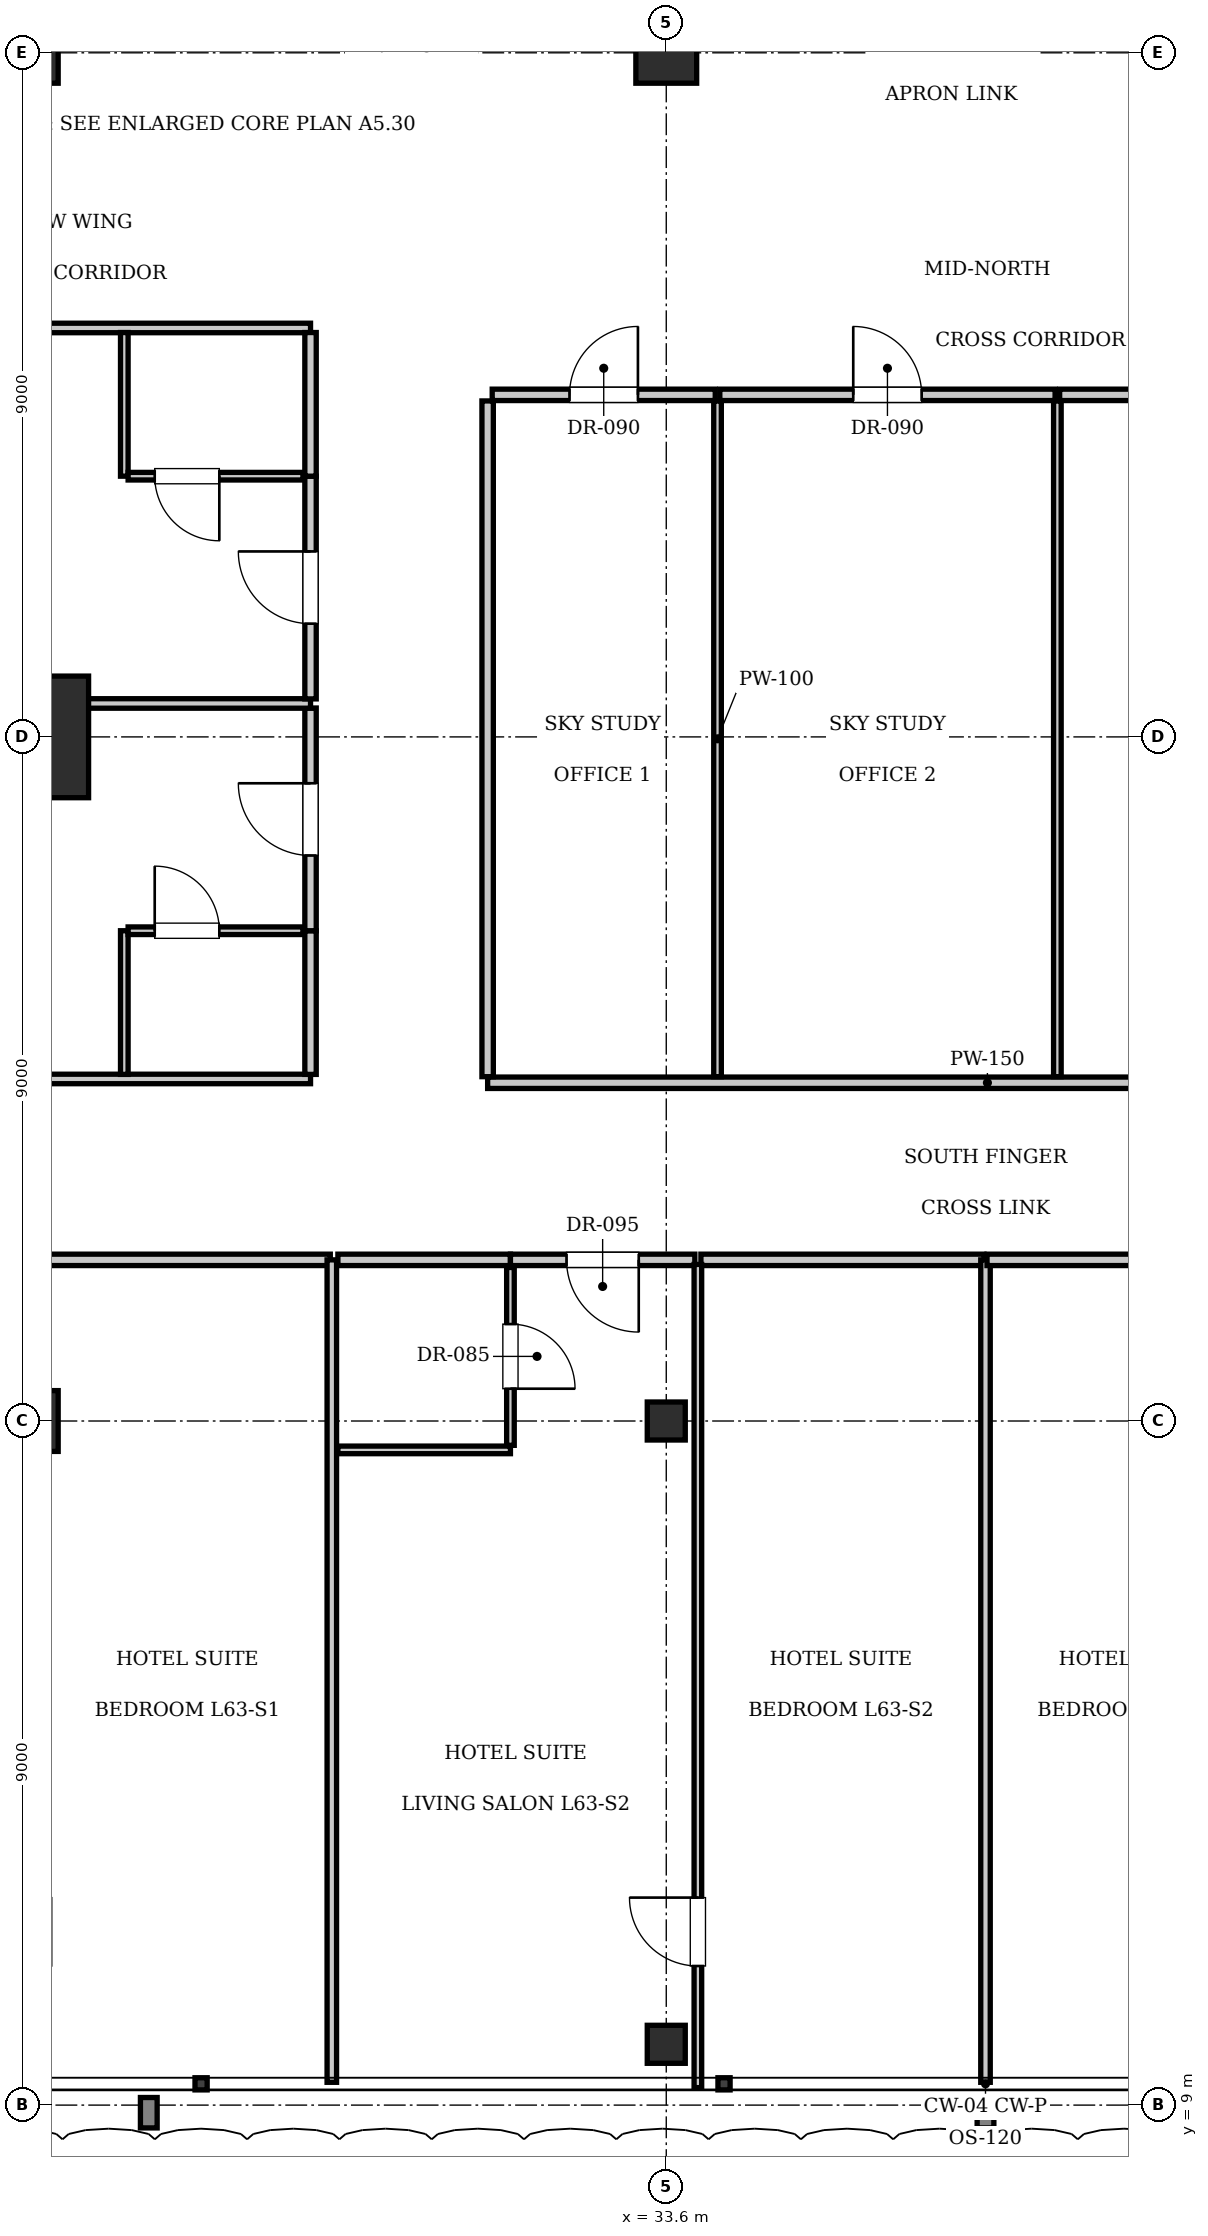
"""IFC4 building model, lengths in metres.
Left out: names, types, materials, properties, quantities, classifications, styles, units other than length and angle.
Written with IfcOpenShell. Run it as: python <this file> out.ifc"""

import sys

from ifc_helpers import new_model, si_unit, direction, frame, frame_2d, origin, origin_2d, place, context, subcontext, project, spatial, rectangle, i_section, extrude, element, fill, save


model = new_model("IFC4")
c1 = context("Model", 3, precision=1e-05, world=origin(), true_north=direction((0.0, 1.0)))
c2 = subcontext(c1, "Body", "Model", "MODEL_VIEW")
j1 = project(units=[si_unit("LENGTHUNIT", "METRE"), si_unit("PLANEANGLEUNIT", "RADIAN")], contexts=[c1])
p1 = place(None, origin())
s1 = spatial("IfcSite", under=j1, at=p1, CompositionType="ELEMENT")
p2 = place(p1, origin())
s2 = spatial("IfcBuilding", under=s1, at=p2, CompositionType="ELEMENT")
p3 = place(p2, frame((0.0, 0.0, 258.65)))
s3 = spatial("IfcBuildingStorey", under=s2, at=p3, CompositionType="ELEMENT", Elevation=258.65)
p4 = place(p3, frame((25.2, 27.0, 0.0), z_axis=(0.0, 0.0, 1.0), x_axis=(1.0, 0.0, 0.0)))
e1 = element("IfcColumn", 1, at=p4, inside=s3, PredefinedType="COLUMN", context=c2, shape_type="SweptSolid", body=[
    extrude(rectangle(XDim=1.6, YDim=1.6, at=origin_2d()), origin(), (0.0, 0.0, 1.0), 3.85),
])
for number, where, z_axis, x_axis in (
    (2, (25.2, 36.0, 0.0), (0.0, 0.0, 1.0), (1.0, 0.0, 0.0)),
    (3, (33.6, 36.0, 0.0), (0.0, 0.0, 1.0), (1.0, 0.0, 0.0)),
    (4, (25.2, 18.0, 0.0), (0.0, 0.0, 1.0), (1.0, 0.0, 0.0)),
):
    element("IfcColumn", number, at=place(p3, frame(where, z_axis=z_axis, x_axis=x_axis)), inside=s3, PredefinedType="COLUMN", context=c2, shape_type="SweptSolid", body=[
        extrude(rectangle(XDim=0.8, YDim=0.8, at=origin_2d()), origin(), (0.0, 0.0, 1.0), 3.85),
    ])
for number, where, z_axis, x_axis in (
    (5, (33.6, 18.0, 0.0), (0.0, 0.0, 1.0), (1.0, 0.0, 0.0)),
    (6, (33.6, 9.8, 0.0), (0.0, 0.0, 1.0), (1.0, 0.0, 0.0)),
):
    element("IfcColumn", number, at=place(p3, frame(where, z_axis=z_axis, x_axis=x_axis)), inside=s3, PredefinedType="COLUMN", context=c2, shape_type="SweptSolid", body=[
        extrude(i_section(OverallWidth=0.5, OverallDepth=0.5, WebThickness=0.022, FlangeThickness=0.032, at=origin_2d()), origin(), (0.0, 0.0, 1.0), 3.85),
    ])
p5 = place(p3, frame((31.25, 22.45, 0.0), z_axis=(0.0, 0.0, 1.0), x_axis=(1.0, 0.0, 0.0)))
e7 = element("IfcWall", 7, at=p5, inside=s3, PredefinedType="PARTITIONING", context=c2, shape_type="SweptSolid", body=[
    extrude(rectangle(XDim=13.15, YDim=0.15, at=frame_2d((6.575, 0.0))), origin(), (0.0, 0.0, 1.0), 3.61),
])
p6 = place(p3, frame((31.25, 22.53, 0.0), z_axis=(0.0, 0.0, 1.0), x_axis=(0.0, 1.0, 0.0)))
e8 = element("IfcWall", 8, at=p6, inside=s3, PredefinedType="PARTITIONING", context=c2, shape_type="SweptSolid", body=[
    extrude(rectangle(XDim=8.89, YDim=0.15, at=frame_2d((4.445, 0.0))), origin(), (0.0, 0.0, 1.0), 3.61),
])
p7 = place(p3, frame((31.31, 31.5, 0.0), z_axis=(0.0, 0.0, 1.0), x_axis=(1.0, 0.0, 0.0)))
e9 = element("IfcWall", 9, at=p7, inside=s3, PredefinedType="PARTITIONING", context=c2, shape_type="SweptSolid", body=[
    extrude(rectangle(XDim=2.934, YDim=0.15, at=frame_2d((1.467, 0.0))), origin(), (0.0, 0.0, 1.0), 3.61),
])
p8 = place(p7, frame((1.017, 0.0, 0.0)))
e10 = element("IfcOpeningElement", 10, at=p8, cuts=e9, PredefinedType="OPENING", context=c2, shape_type="SweptSolid", body=[
    extrude(rectangle(XDim=0.9, YDim=2.1, at=frame_2d((0.45, 1.05))), frame((0.0, 0.085, 0.0), z_axis=(0.0, -1.0, 0.0), x_axis=(1.0, 0.0, 0.0)), (0.0, 0.0, 1.0), 0.17),
])
p9 = place(p3, frame((34.274, 22.53, 0.0), z_axis=(0.0, 0.0, 1.0), x_axis=(0.0, 1.0, 0.0)))
e11 = element("IfcWall", 11, at=p9, inside=s3, PredefinedType="PARTITIONING", context=c2, shape_type="SweptSolid", body=[
    extrude(rectangle(XDim=8.89, YDim=0.1, at=frame_2d((4.445, 0.0))), origin(), (0.0, 0.0, 1.0), 3.61),
])
p10 = place(p3, frame((34.304, 31.5, 0.0), z_axis=(0.0, 0.0, 1.0), x_axis=(1.0, 0.0, 0.0)))
e12 = element("IfcWall", 12, at=p10, inside=s3, PredefinedType="PARTITIONING", context=c2, shape_type="SweptSolid", body=[
    extrude(rectangle(XDim=4.411, YDim=0.15, at=frame_2d((2.206, 0.0))), origin(), (0.0, 0.0, 1.0), 3.61),
])
p11 = place(p10, frame((1.756, 0.0, 0.0)))
e13 = element("IfcOpeningElement", 13, at=p11, cuts=e12, PredefinedType="OPENING", context=c2, shape_type="SweptSolid", body=[
    extrude(rectangle(XDim=0.9, YDim=2.1, at=frame_2d((0.45, 1.05))), frame((0.0, 0.085, 0.0), z_axis=(0.0, -1.0, 0.0), x_axis=(1.0, 0.0, 0.0)), (0.0, 0.0, 1.0), 0.17),
])
p12 = place(p3, frame((38.746, 22.53, 0.0), z_axis=(0.0, 0.0, 1.0), x_axis=(0.0, 1.0, 0.0)))
e14 = element("IfcWall", 14, at=p12, inside=s3, PredefinedType="PARTITIONING", context=c2, shape_type="SweptSolid", body=[
    extrude(rectangle(XDim=8.89, YDim=0.1, at=frame_2d((4.445, 0.0))), origin(), (0.0, 0.0, 1.0), 3.61),
])
p13 = place(p3, frame((38.775, 31.5, 0.0), z_axis=(0.0, 0.0, 1.0), x_axis=(1.0, 0.0, 0.0)))
e15 = element("IfcWall", 15, at=p13, inside=s3, PredefinedType="PARTITIONING", context=c2, shape_type="SweptSolid", body=[
    extrude(rectangle(XDim=5.565, YDim=0.15, at=frame_2d((2.782, 0.0))), origin(), (0.0, 0.0, 1.0), 3.61),
])
p14 = place(p13, frame((2.332, 0.0, 0.0)))
e16 = element("IfcOpeningElement", 16, at=p14, cuts=e15, PredefinedType="OPENING", context=c2, shape_type="SweptSolid", body=[
    extrude(rectangle(XDim=0.9, YDim=2.1, at=frame_2d((0.45, 1.05))), frame((0.0, 0.085, 0.0), z_axis=(0.0, -1.0, 0.0), x_axis=(1.0, 0.0, 0.0)), (0.0, 0.0, 1.0), 0.17),
])
p15 = place(p3, frame((25.456, 20.12, 0.0), z_axis=(0.0, 0.0, 1.0), x_axis=(1.0, 0.0, 0.0)))
e17 = element("IfcWall", 17, at=p15, inside=s3, PredefinedType="PARTITIONING", context=c2, shape_type="SweptSolid", body=[
    extrude(rectangle(XDim=3.724, YDim=0.15, at=frame_2d((1.862, 0.0))), origin(), (0.0, 0.0, 1.0), 3.61),
])
p16 = place(p3, frame((29.2, 9.3, 0.0), z_axis=(0.0, 0.0, 1.0), x_axis=(0.0, 1.0, 0.0)))
e18 = element("IfcWall", 18, at=p16, inside=s3, PredefinedType="PARTITIONING", context=c2, shape_type="SweptSolid", body=[
    extrude(rectangle(XDim=10.82, YDim=0.125, at=frame_2d((5.41, 0.0))), origin(), (0.0, 0.0, 1.0), 3.61),
])
p17 = place(p3, frame((29.28, 20.12, 0.0), z_axis=(0.0, 0.0, 1.0), x_axis=(1.0, 0.0, 0.0)))
e19 = element("IfcWall", 19, at=p17, inside=s3, PredefinedType="PARTITIONING", context=c2, shape_type="SweptSolid", body=[
    extrude(rectangle(XDim=2.27, YDim=0.15, at=frame_2d((1.135, 0.0))), origin(), (0.0, 0.0, 1.0), 3.61),
])
p18 = place(p3, frame((29.28, 17.62, 0.0), z_axis=(0.0, 0.0, 1.0), x_axis=(1.0, 0.0, 0.0)))
e20 = element("IfcWall", 20, at=p18, inside=s3, PredefinedType="PARTITIONING", context=c2, shape_type="SweptSolid", body=[
    extrude(rectangle(XDim=2.27, YDim=0.1, at=frame_2d((1.135, 0.0))), origin(), (0.0, 0.0, 1.0), 3.61),
])
p19 = place(p3, frame((31.55, 17.68, 0.0), z_axis=(0.0, 0.0, 1.0), x_axis=(0.0, 1.0, 0.0)))
e21 = element("IfcWall", 21, at=p19, inside=s3, PredefinedType="PARTITIONING", context=c2, shape_type="SweptSolid", body=[
    extrude(rectangle(XDim=2.34, YDim=0.1, at=frame_2d((1.17, 0.0))), origin(), (0.0, 0.0, 1.0), 3.61),
])
p20 = place(p19, frame((0.745, 0.0, 0.0)))
e22 = element("IfcOpeningElement", 22, at=p20, cuts=e21, PredefinedType="OPENING", context=c2, shape_type="SweptSolid", body=[
    extrude(rectangle(XDim=0.85, YDim=2.1, at=frame_2d((0.425, 1.05))), frame((0.0, 0.06, 0.0), z_axis=(0.0, -1.0, 0.0), x_axis=(1.0, 0.0, 0.0)), (0.0, 0.0, 1.0), 0.12),
])
p21 = place(p3, frame((31.55, 20.12, 0.0), z_axis=(0.0, 0.0, 1.0), x_axis=(1.0, 0.0, 0.0)))
e23 = element("IfcWall", 23, at=p21, inside=s3, PredefinedType="PARTITIONING", context=c2, shape_type="SweptSolid", body=[
    extrude(rectangle(XDim=2.426, YDim=0.15, at=frame_2d((1.213, 0.0))), origin(), (0.0, 0.0, 1.0), 3.61),
])
p22 = place(p21, frame((0.738, 0.0, 0.0)))
e24 = element("IfcOpeningElement", 24, at=p22, cuts=e23, PredefinedType="OPENING", context=c2, shape_type="SweptSolid", body=[
    extrude(rectangle(XDim=0.95, YDim=2.15, at=frame_2d((0.475, 1.075))), frame((0.0, 0.085, 0.0), z_axis=(0.0, -1.0, 0.0), x_axis=(1.0, 0.0, 0.0)), (0.0, 0.0, 1.0), 0.17),
])
p23 = place(p3, frame((34.056, 20.12, 0.0), z_axis=(0.0, 0.0, 1.0), x_axis=(1.0, 0.0, 0.0)))
e25 = element("IfcWall", 25, at=p23, inside=s3, PredefinedType="PARTITIONING", context=c2, shape_type="SweptSolid", body=[
    extrude(rectangle(XDim=3.724, YDim=0.15, at=frame_2d((1.862, 0.0))), origin(), (0.0, 0.0, 1.0), 3.61),
])
p24 = place(p3, frame((34.016, 9.23, 0.0), z_axis=(0.0, 0.0, 1.0), x_axis=(0.0, 1.0, 0.0)))
e26 = element("IfcWall", 26, at=p24, inside=s3, PredefinedType="PARTITIONING", context=c2, shape_type="SweptSolid", body=[
    extrude(rectangle(XDim=10.83, YDim=0.1, at=frame_2d((5.415, 0.0))), origin(), (0.0, 0.0, 1.0), 3.61),
])
p25 = place(p24, frame((1.6, 0.0, 0.0)))
e27 = element("IfcOpeningElement", 27, at=p25, cuts=e26, PredefinedType="OPENING", context=c2, shape_type="SweptSolid", body=[
    extrude(rectangle(XDim=0.9, YDim=2.1, at=frame_2d((0.45, 1.05))), frame((0.0, 0.06, 0.0), z_axis=(0.0, -1.0, 0.0), x_axis=(1.0, 0.0, 0.0)), (0.0, 0.0, 1.0), 0.12),
])
p26 = place(p3, frame((37.8, 9.3, 0.0), z_axis=(0.0, 0.0, 1.0), x_axis=(0.0, 1.0, 0.0)))
e28 = element("IfcWall", 28, at=p26, inside=s3, PredefinedType="PARTITIONING", context=c2, shape_type="SweptSolid", body=[
    extrude(rectangle(XDim=10.82, YDim=0.125, at=frame_2d((5.41, 0.0))), origin(), (0.0, 0.0, 1.0), 3.457),
])
p27 = place(p3, frame((37.82, 20.12, 0.0), z_axis=(0.0, 0.0, 1.0), x_axis=(1.0, 0.0, 0.0)))
e29 = element("IfcWall", 29, at=p27, inside=s3, PredefinedType="PARTITIONING", context=c2, shape_type="SweptSolid", body=[
    extrude(rectangle(XDim=3.724, YDim=0.15, at=frame_2d((1.862, 0.0))), origin(), (0.0, 0.0, 1.0), 3.61),
])
for number, where, z_axis, x_axis in (
    (30, (15.5, 22.5, 0.0), (0.0, 0.0, 1.0), (1.0, 0.0, 0.0)),
    (31, (15.5, 32.38, 0.0), (0.0, 0.0, 1.0), (1.0, 0.0, 0.0)),
):
    element("IfcWall", number, at=place(p3, frame(where, z_axis=z_axis, x_axis=x_axis)), inside=s3, PredefinedType="PARTITIONING", context=c2, shape_type="SweptSolid", body=[
        extrude(rectangle(XDim=13.42, YDim=0.125, at=frame_2d((6.71, 0.0))), origin(), (0.0, 0.0, 1.0), 3.61),
    ])
p28 = place(p3, frame((28.92, 22.56, 0.0), z_axis=(0.0, 0.0, 1.0), x_axis=(0.0, 1.0, 0.0)))
e32 = element("IfcWall", 32, at=p28, inside=s3, PredefinedType="PARTITIONING", context=c2, shape_type="SweptSolid", body=[
    extrude(rectangle(XDim=1.89, YDim=0.15, at=frame_2d((0.945, 0.0))), origin(), (0.0, 0.0, 1.0), 3.61),
])
p29 = place(p3, frame((28.92, 24.45, 0.0), z_axis=(0.0, 0.0, 1.0), x_axis=(0.0, 1.0, 0.0)))
e33 = element("IfcWall", 33, at=p29, inside=s3, PredefinedType="PARTITIONING", context=c2, shape_type="SweptSolid", body=[
    extrude(rectangle(XDim=2.93, YDim=0.15, at=frame_2d((1.465, 0.0))), origin(), (0.0, 0.0, 1.0), 3.61),
])
p30 = place(p29, frame((0.99, 0.0, 0.0)))
e34 = element("IfcOpeningElement", 34, at=p30, cuts=e33, PredefinedType="OPENING", context=c2, shape_type="SweptSolid", body=[
    extrude(rectangle(XDim=0.95, YDim=2.15, at=frame_2d((0.475, 1.075))), frame((0.0, 0.085, 0.0), z_axis=(0.0, -1.0, 0.0), x_axis=(1.0, 0.0, 0.0)), (0.0, 0.0, 1.0), 0.17),
])
p31 = place(p3, frame((26.47, 22.56, 0.0), z_axis=(0.0, 0.0, 1.0), x_axis=(0.0, 1.0, 0.0)))
e35 = element("IfcWall", 35, at=p31, inside=s3, PredefinedType="PARTITIONING", context=c2, shape_type="SweptSolid", body=[
    extrude(rectangle(XDim=1.89, YDim=0.1, at=frame_2d((0.945, 0.0))), origin(), (0.0, 0.0, 1.0), 3.61),
])
p32 = place(p3, frame((26.52, 24.45, 0.0), z_axis=(0.0, 0.0, 1.0), x_axis=(1.0, 0.0, 0.0)))
e36 = element("IfcWall", 36, at=p32, inside=s3, PredefinedType="PARTITIONING", context=c2, shape_type="SweptSolid", body=[
    extrude(rectangle(XDim=2.3, YDim=0.1, at=frame_2d((1.15, 0.0))), origin(), (0.0, 0.0, 1.0), 3.61),
])
p33 = place(p32, frame((0.35, 0.0, 0.0)))
e37 = element("IfcOpeningElement", 37, at=p33, cuts=e36, PredefinedType="OPENING", context=c2, shape_type="SweptSolid", body=[
    extrude(rectangle(XDim=0.85, YDim=2.1, at=frame_2d((0.425, 1.05))), frame((0.0, 0.06, 0.0), z_axis=(0.0, -1.0, 0.0), x_axis=(1.0, 0.0, 0.0)), (0.0, 0.0, 1.0), 0.12),
])
p34 = place(p3, frame((15.5, 27.44, 0.0), z_axis=(0.0, 0.0, 1.0), x_axis=(1.0, 0.0, 0.0)))
e38 = element("IfcWall", 38, at=p34, inside=s3, PredefinedType="PARTITIONING", context=c2, shape_type="SweptSolid", body=[
    extrude(rectangle(XDim=13.42, YDim=0.125, at=frame_2d((6.71, 0.0))), origin(), (0.0, 0.0, 1.0), 3.61),
])
p35 = place(p3, frame((28.92, 27.5, 0.0), z_axis=(0.0, 0.0, 1.0), x_axis=(0.0, 1.0, 0.0)))
e39 = element("IfcWall", 39, at=p35, inside=s3, PredefinedType="PARTITIONING", context=c2, shape_type="SweptSolid", body=[
    extrude(rectangle(XDim=2.93, YDim=0.15, at=frame_2d((1.465, 0.0))), origin(), (0.0, 0.0, 1.0), 3.61),
])
p36 = place(p35, frame((0.99, 0.0, 0.0)))
e40 = element("IfcOpeningElement", 40, at=p36, cuts=e39, PredefinedType="OPENING", context=c2, shape_type="SweptSolid", body=[
    extrude(rectangle(XDim=0.95, YDim=2.15, at=frame_2d((0.475, 1.075))), frame((0.0, 0.085, 0.0), z_axis=(0.0, -1.0, 0.0), x_axis=(1.0, 0.0, 0.0)), (0.0, 0.0, 1.0), 0.17),
])
p37 = place(p3, frame((28.92, 30.43, 0.0), z_axis=(0.0, 0.0, 1.0), x_axis=(0.0, 1.0, 0.0)))
e41 = element("IfcWall", 41, at=p37, inside=s3, PredefinedType="PARTITIONING", context=c2, shape_type="SweptSolid", body=[
    extrude(rectangle(XDim=1.89, YDim=0.15, at=frame_2d((0.945, 0.0))), origin(), (0.0, 0.0, 1.0), 3.61),
])
p38 = place(p3, frame((26.47, 30.43, 0.0), z_axis=(0.0, 0.0, 1.0), x_axis=(0.0, 1.0, 0.0)))
e42 = element("IfcWall", 42, at=p38, inside=s3, PredefinedType="PARTITIONING", context=c2, shape_type="SweptSolid", body=[
    extrude(rectangle(XDim=1.89, YDim=0.1, at=frame_2d((0.945, 0.0))), origin(), (0.0, 0.0, 1.0), 3.61),
])
p39 = place(p3, frame((26.52, 30.43, 0.0), z_axis=(0.0, 0.0, 1.0), x_axis=(1.0, 0.0, 0.0)))
e43 = element("IfcWall", 43, at=p39, inside=s3, PredefinedType="PARTITIONING", context=c2, shape_type="SweptSolid", body=[
    extrude(rectangle(XDim=2.3, YDim=0.1, at=frame_2d((1.15, 0.0))), origin(), (0.0, 0.0, 1.0), 3.61),
])
p40 = place(p39, frame((0.35, 0.0, 0.0)))
e44 = element("IfcOpeningElement", 44, at=p40, cuts=e43, PredefinedType="OPENING", context=c2, shape_type="SweptSolid", body=[
    extrude(rectangle(XDim=0.85, YDim=2.1, at=frame_2d((0.425, 1.05))), frame((0.0, 0.06, 0.0), z_axis=(0.0, -1.0, 0.0), x_axis=(1.0, 0.0, 0.0)), (0.0, 0.0, 1.0), 0.12),
])
p41 = place(p8, origin())
e45 = element("IfcDoor", 45, at=p41, inside=s3, OperationType="SINGLE_SWING_RIGHT", PredefinedType="DOOR", context=c2, shape_type="SweptSolid", body=[
    extrude(rectangle(XDim=0.9, YDim=2.1, at=frame_2d((0.45, 1.05))), frame((0.0, 0.025, 0.0), z_axis=(0.0, -1.0, 0.0), x_axis=(1.0, 0.0, 0.0)), (0.0, 0.0, 1.0), 0.05),
])
fill(e10, e45)
p42 = place(p11, origin())
e46 = element("IfcDoor", 46, at=p42, inside=s3, OperationType="SINGLE_SWING_LEFT", PredefinedType="DOOR", context=c2, shape_type="SweptSolid", body=[
    extrude(rectangle(XDim=0.9, YDim=2.1, at=frame_2d((0.45, 1.05))), frame((0.0, 0.025, 0.0), z_axis=(0.0, -1.0, 0.0), x_axis=(1.0, 0.0, 0.0)), (0.0, 0.0, 1.0), 0.05),
])
fill(e13, e46)
p43 = place(p20, frame((0.85, 0.0, 0.0), z_axis=(0.0, 0.0, 1.0), x_axis=(-1.0, 0.0, 0.0)))
e47 = element("IfcDoor", 47, at=p43, inside=s3, OperationType="SINGLE_SWING_RIGHT", PredefinedType="DOOR", context=c2, shape_type="SweptSolid", body=[
    extrude(rectangle(XDim=0.85, YDim=2.1, at=frame_2d((0.425, 1.05))), frame((0.0, 0.025, 0.0), z_axis=(0.0, -1.0, 0.0), x_axis=(1.0, 0.0, 0.0)), (0.0, 0.0, 1.0), 0.05),
])
fill(e22, e47)
p44 = place(p22, frame((0.95, 0.0, 0.0), z_axis=(0.0, 0.0, 1.0), x_axis=(-1.0, 0.0, 0.0)))
e48 = element("IfcDoor", 48, at=p44, inside=s3, OperationType="SINGLE_SWING_LEFT", PredefinedType="DOOR", context=c2, shape_type="SweptSolid", body=[
    extrude(rectangle(XDim=0.95, YDim=2.15, at=frame_2d((0.475, 1.075))), frame((0.0, 0.025, 0.0), z_axis=(0.0, -1.0, 0.0), x_axis=(1.0, 0.0, 0.0)), (0.0, 0.0, 1.0), 0.05),
])
fill(e24, e48)
p45 = place(p25, origin())
e49 = element("IfcDoor", 49, at=p45, inside=s3, OperationType="SINGLE_SWING_RIGHT", PredefinedType="DOOR", context=c2, shape_type="SweptSolid", body=[
    extrude(rectangle(XDim=0.9, YDim=2.1, at=frame_2d((0.45, 1.05))), frame((0.0, 0.025, 0.0), z_axis=(0.0, -1.0, 0.0), x_axis=(1.0, 0.0, 0.0)), (0.0, 0.0, 1.0), 0.05),
])
fill(e27, e49)
p46 = place(p33, origin())
e50 = element("IfcDoor", 50, at=p46, inside=s3, OperationType="SINGLE_SWING_LEFT", PredefinedType="DOOR", context=c2, shape_type="SweptSolid", body=[
    extrude(rectangle(XDim=0.85, YDim=2.1, at=frame_2d((0.425, 1.05))), frame((0.0, 0.025, 0.0), z_axis=(0.0, -1.0, 0.0), x_axis=(1.0, 0.0, 0.0)), (0.0, 0.0, 1.0), 0.05),
])
fill(e37, e50)
p47 = place(p30, origin())
e51 = element("IfcDoor", 51, at=p47, inside=s3, OperationType="SINGLE_SWING_RIGHT", PredefinedType="DOOR", context=c2, shape_type="SweptSolid", body=[
    extrude(rectangle(XDim=0.95, YDim=2.15, at=frame_2d((0.475, 1.075))), frame((0.0, 0.025, 0.0), z_axis=(0.0, -1.0, 0.0), x_axis=(1.0, 0.0, 0.0)), (0.0, 0.0, 1.0), 0.05),
])
fill(e34, e51)
p48 = place(p40, frame((0.85, 0.0, 0.0), z_axis=(0.0, 0.0, 1.0), x_axis=(-1.0, 0.0, 0.0)))
e52 = element("IfcDoor", 52, at=p48, inside=s3, OperationType="SINGLE_SWING_LEFT", PredefinedType="DOOR", context=c2, shape_type="SweptSolid", body=[
    extrude(rectangle(XDim=0.85, YDim=2.1, at=frame_2d((0.425, 1.05))), frame((0.0, 0.025, 0.0), z_axis=(0.0, -1.0, 0.0), x_axis=(1.0, 0.0, 0.0)), (0.0, 0.0, 1.0), 0.05),
])
fill(e44, e52)
p49 = place(p36, origin())
e53 = element("IfcDoor", 53, at=p49, inside=s3, OperationType="SINGLE_SWING_RIGHT", PredefinedType="DOOR", context=c2, shape_type="SweptSolid", body=[
    extrude(rectangle(XDim=0.95, YDim=2.15, at=frame_2d((0.475, 1.075))), frame((0.0, 0.025, 0.0), z_axis=(0.0, -1.0, 0.0), x_axis=(1.0, 0.0, 0.0)), (0.0, 0.0, 1.0), 0.05),
])
fill(e40, e53)
save(model, sys.argv[1])
